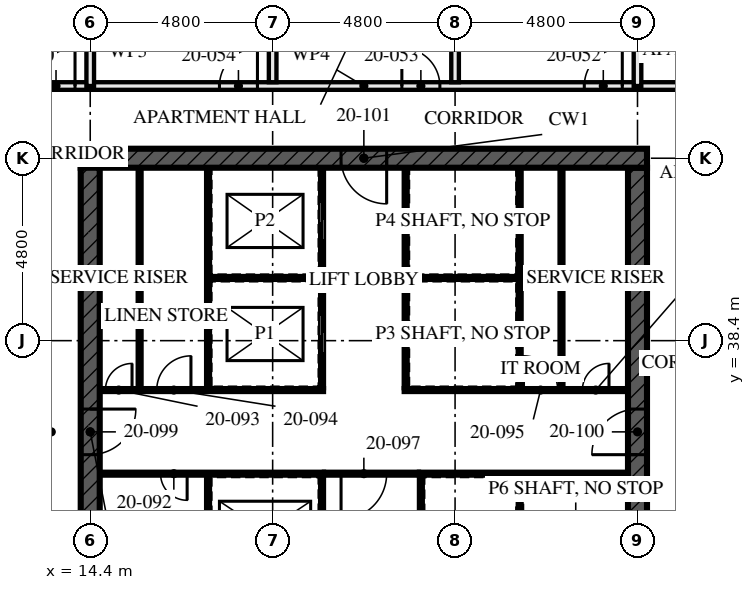
"""IFC4 building model, lengths in metres.
Left out: names, types, materials, properties, quantities, classifications, styles, units other than length and angle.
Written with IfcOpenShell. Run it as: python <this file> out.ifc"""

import sys

from ifc_helpers import new_model, si_unit, direction, frame, frame_2d, origin, place, context, subcontext, project, spatial, rectangle, extrude, element, fill, save


model = new_model("IFC4")
c1 = context("Model", 3, precision=1e-05, world=origin(), true_north=direction((0.0, 1.0)))
c2 = subcontext(c1, "Body", "Model", "MODEL_VIEW")
j1 = project(units=[si_unit("LENGTHUNIT", "METRE"), si_unit("PLANEANGLEUNIT", "RADIAN")], contexts=[c1])
p1 = place(None, origin())
s1 = spatial("IfcSite", under=j1, at=p1, CompositionType="ELEMENT")
p2 = place(p1, origin())
s2 = spatial("IfcBuilding", under=s1, at=p2, CompositionType="ELEMENT")
p3 = place(p2, frame((0.0, 0.0, 76.0)))
s3 = spatial("IfcBuildingStorey", under=s2, at=p3, CompositionType="ELEMENT", Elevation=76.0)
p4 = place(p3, frame((29.05, 43.2, -0.17), z_axis=(0.0, 0.0, 1.0), x_axis=(-1.0, 0.0, 0.0)))
e1 = element("IfcWall", 1, at=p4, inside=s3, PredefinedType="SHEAR", context=c2, shape_type="SweptSolid", body=[
    extrude(rectangle(XDim=14.9, YDim=0.5, at=frame_2d((7.45, 0.0))), origin(), (0.0, 0.0, 1.0), 3.42),
])
p5 = place(p4, frame((6.85, 0.0, 0.17)))
e2 = element("IfcOpeningElement", 2, at=p5, cuts=e1, PredefinedType="OPENING", context=c2, shape_type="SweptSolid", body=[
    extrude(rectangle(XDim=1.2, YDim=2.1, at=frame_2d((0.6, 1.05))), frame((0.0, 0.26, 0.0), z_axis=(0.0, -1.0, 0.0), x_axis=(1.0, 0.0, 0.0)), (0.0, 0.0, 1.0), 0.521),
])
p6 = place(p3, frame((14.4, 42.95, -0.17), z_axis=(0.0, 0.0, 1.0), x_axis=(0.0, -1.0, 0.0)))
e3 = element("IfcWall", 3, at=p6, inside=s3, PredefinedType="SHEAR", context=c2, shape_type="SweptSolid", body=[
    extrude(rectangle(XDim=13.9, YDim=0.5, at=frame_2d((6.95, 0.0))), origin(), (0.0, 0.0, 1.0), 3.42),
])
p7 = place(p6, frame((6.35, 0.0, 0.17)))
e4 = element("IfcOpeningElement", 4, at=p7, cuts=e3, PredefinedType="OPENING", context=c2, shape_type="SweptSolid", body=[
    extrude(rectangle(XDim=1.2, YDim=2.1, at=frame_2d((0.6, 1.05))), frame((0.0, 0.26, 0.0), z_axis=(0.0, -1.0, 0.0), x_axis=(1.0, 0.0, 0.0)), (0.0, 0.0, 1.0), 0.521),
])
p8 = place(p3, frame((28.8, 29.05, -0.17), z_axis=(0.0, 0.0, 1.0), x_axis=(0.0, 1.0, 0.0)))
e5 = element("IfcWall", 5, at=p8, inside=s3, PredefinedType="SHEAR", context=c2, shape_type="SweptSolid", body=[
    extrude(rectangle(XDim=13.9, YDim=0.5, at=frame_2d((6.95, 0.0))), origin(), (0.0, 0.0, 1.0), 3.42),
])
p9 = place(p8, frame((6.35, 0.0, 0.17)))
e6 = element("IfcOpeningElement", 6, at=p9, cuts=e5, PredefinedType="OPENING", context=c2, shape_type="SweptSolid", body=[
    extrude(rectangle(XDim=1.2, YDim=2.1, at=frame_2d((0.6, 1.05))), frame((0.0, 0.26, 0.0), z_axis=(0.0, -1.0, 0.0), x_axis=(1.0, 0.0, 0.0)), (0.0, 0.0, 1.0), 0.521),
])
p10 = place(p3, frame((14.4, 45.1, 0.0), z_axis=(0.0, 0.0, 1.0), x_axis=(-1.0, 0.0, 0.0)))
e7 = element("IfcWall", 7, at=p10, inside=s3, PredefinedType="PARTITIONING", context=c2, shape_type="SweptSolid", body=[
    extrude(rectangle(XDim=9.6, YDim=0.2, at=frame_2d((4.8, 0.0))), origin(), (0.0, 0.0, 1.0), 3.25),
])
p11 = place(p10, frame((0.4, 0.0, 0.0)))
e8 = element("IfcOpeningElement", 8, at=p11, cuts=e7, PredefinedType="OPENING", context=c2, shape_type="SweptSolid", body=[
    extrude(rectangle(XDim=1.0, YDim=2.1, at=frame_2d((0.5, 1.05))), frame((0.0, 0.111, 0.0), z_axis=(0.0, -1.0, 0.0), x_axis=(1.0, 0.0, 0.0)), (0.0, 0.0, 1.0), 0.221),
])
p12 = place(p10, frame((5.2, 0.0, 0.0)))
e9 = element("IfcOpeningElement", 9, at=p12, cuts=e7, PredefinedType="OPENING", context=c2, shape_type="SweptSolid", body=[
    extrude(rectangle(XDim=1.0, YDim=2.1, at=frame_2d((0.5, 1.05))), frame((0.0, 0.111, 0.0), z_axis=(0.0, -1.0, 0.0), x_axis=(1.0, 0.0, 0.0)), (0.0, 0.0, 1.0), 0.221),
])
for number, where, z_axis, x_axis in (
    (10, (24.0, 57.28, 0.0), (0.0, 0.0, 1.0), (0.0, -1.0, 0.0)),
    (11, (19.2, 57.28, 0.0), (0.0, 0.0, 1.0), (0.0, -1.0, 0.0)),
):
    element("IfcWall", number, at=place(p3, frame(where, z_axis=z_axis, x_axis=x_axis)), inside=s3, PredefinedType="PARTITIONING", context=c2, shape_type="SweptSolid", body=[
        extrude(rectangle(XDim=12.08, YDim=0.2, at=frame_2d((6.04, 0.0))), origin(), (0.0, 0.0, 1.0), 2.04),
    ])
p13 = place(p3, frame((28.8, 45.1, 0.0), z_axis=(0.0, 0.0, 1.0), x_axis=(-1.0, 0.0, 0.0)))
e12 = element("IfcWall", 12, at=p13, inside=s3, PredefinedType="PARTITIONING", context=c2, shape_type="SweptSolid", body=[
    extrude(rectangle(XDim=14.4, YDim=0.2, at=frame_2d((7.2, 0.0))), origin(), (0.0, 0.0, 1.0), 3.25),
])
p14 = place(p13, frame((0.4, 0.0, 0.0)))
e13 = element("IfcOpeningElement", 13, at=p14, cuts=e12, PredefinedType="OPENING", context=c2, shape_type="SweptSolid", body=[
    extrude(rectangle(XDim=1.0, YDim=2.1, at=frame_2d((0.5, 1.05))), frame((0.0, 0.111, 0.0), z_axis=(0.0, -1.0, 0.0), x_axis=(1.0, 0.0, 0.0)), (0.0, 0.0, 1.0), 0.221),
])
p15 = place(p13, frame((5.2, 0.0, 0.0)))
e14 = element("IfcOpeningElement", 14, at=p15, cuts=e12, PredefinedType="OPENING", context=c2, shape_type="SweptSolid", body=[
    extrude(rectangle(XDim=1.0, YDim=2.1, at=frame_2d((0.5, 1.05))), frame((0.0, 0.111, 0.0), z_axis=(0.0, -1.0, 0.0), x_axis=(1.0, 0.0, 0.0)), (0.0, 0.0, 1.0), 0.221),
])
p16 = place(p13, frame((10.0, 0.0, 0.0)))
e15 = element("IfcOpeningElement", 15, at=p16, cuts=e12, PredefinedType="OPENING", context=c2, shape_type="SweptSolid", body=[
    extrude(rectangle(XDim=1.0, YDim=2.1, at=frame_2d((0.5, 1.05))), frame((0.0, 0.111, 0.0), z_axis=(0.0, -1.0, 0.0), x_axis=(1.0, 0.0, 0.0)), (0.0, 0.0, 1.0), 0.221),
])
p17 = place(p3, frame((38.4, 45.1, 0.0), z_axis=(0.0, 0.0, 1.0), x_axis=(-1.0, 0.0, 0.0)))
e16 = element("IfcWall", 16, at=p17, inside=s3, PredefinedType="PARTITIONING", context=c2, shape_type="SweptSolid", body=[
    extrude(rectangle(XDim=9.6, YDim=0.2, at=frame_2d((4.8, 0.0))), origin(), (0.0, 0.0, 1.0), 3.25),
])
p18 = place(p17, frame((0.4, 0.0, 0.0)))
e17 = element("IfcOpeningElement", 17, at=p18, cuts=e16, PredefinedType="OPENING", context=c2, shape_type="SweptSolid", body=[
    extrude(rectangle(XDim=1.0, YDim=2.1, at=frame_2d((0.5, 1.05))), frame((0.0, 0.111, 0.0), z_axis=(0.0, -1.0, 0.0), x_axis=(1.0, 0.0, 0.0)), (0.0, 0.0, 1.0), 0.221),
])
p19 = place(p17, frame((5.2, 0.0, 0.0)))
e18 = element("IfcOpeningElement", 18, at=p19, cuts=e16, PredefinedType="OPENING", context=c2, shape_type="SweptSolid", body=[
    extrude(rectangle(XDim=1.0, YDim=2.1, at=frame_2d((0.5, 1.05))), frame((0.0, 0.111, 0.0), z_axis=(0.0, -1.0, 0.0), x_axis=(1.0, 0.0, 0.0)), (0.0, 0.0, 1.0), 0.221),
])
for number, where, z_axis, x_axis in (
    (19, (15.7, 37.15, 0.0), (0.0, 0.0, 1.0), (0.0, 1.0, 0.0)),
    (20, (26.8, 37.15, 0.0), (0.0, 0.0, 1.0), (0.0, 1.0, 0.0)),
):
    element("IfcWall", number, at=place(p3, frame(where, z_axis=z_axis, x_axis=x_axis)), inside=s3, PredefinedType="SOLIDWALL", context=c2, shape_type="SweptSolid", body=[
        extrude(rectangle(XDim=5.8, YDim=0.1, at=frame_2d((2.9, 0.0))), origin(), (0.0, 0.0, 1.0), 3.25),
    ])
p20 = place(p3, frame((20.5, 29.05, 0.0), z_axis=(0.0, 0.0, 1.0), x_axis=(0.0, 1.0, 0.0)))
e21 = element("IfcWall", 21, at=p20, inside=s3, PredefinedType="SOLIDWALL", context=c2, shape_type="SweptSolid", body=[
    extrude(rectangle(XDim=5.8, YDim=0.1, at=frame_2d((2.9, 0.0))), origin(), (0.0, 0.0, 1.0), 3.25),
])
p21 = place(p20, frame((0.8, 0.0, 0.0)))
e22 = element("IfcOpeningElement", 22, at=p21, cuts=e21, PredefinedType="OPENING", context=c2, shape_type="SweptSolid", body=[
    extrude(rectangle(XDim=1.1, YDim=2.3, at=frame_2d((0.55, 1.15))), frame((0.0, 0.061, 0.0), z_axis=(0.0, -1.0, 0.0), x_axis=(1.0, 0.0, 0.0)), (0.0, 0.0, 1.0), 0.121),
])
p22 = place(p20, frame((3.775, 0.0, 0.0)))
e23 = element("IfcOpeningElement", 23, at=p22, cuts=e21, PredefinedType="OPENING", context=c2, shape_type="SweptSolid", body=[
    extrude(rectangle(XDim=1.1, YDim=2.3, at=frame_2d((0.55, 1.15))), frame((0.0, 0.061, 0.0), z_axis=(0.0, -1.0, 0.0), x_axis=(1.0, 0.0, 0.0)), (0.0, 0.0, 1.0), 0.121),
])
p23 = place(p3, frame((20.5, 37.15, 0.0), z_axis=(0.0, 0.0, 1.0), x_axis=(0.0, 1.0, 0.0)))
e24 = element("IfcWall", 24, at=p23, inside=s3, PredefinedType="SOLIDWALL", context=c2, shape_type="SweptSolid", body=[
    extrude(rectangle(XDim=5.8, YDim=0.1, at=frame_2d((2.9, 0.0))), origin(), (0.0, 0.0, 1.0), 3.25),
])
p24 = place(p23, frame((0.925, 0.0, 0.0)))
e25 = element("IfcOpeningElement", 25, at=p24, cuts=e24, PredefinedType="OPENING", context=c2, shape_type="SweptSolid", body=[
    extrude(rectangle(XDim=1.0, YDim=2.1, at=frame_2d((0.5, 1.05))), frame((0.0, 0.061, 0.0), z_axis=(0.0, -1.0, 0.0), x_axis=(1.0, 0.0, 0.0)), (0.0, 0.0, 1.0), 0.121),
])
p25 = place(p23, frame((3.9, 0.0, 0.0)))
e26 = element("IfcOpeningElement", 26, at=p25, cuts=e24, PredefinedType="OPENING", context=c2, shape_type="SweptSolid", body=[
    extrude(rectangle(XDim=1.0, YDim=2.1, at=frame_2d((0.5, 1.05))), frame((0.0, 0.061, 0.0), z_axis=(0.0, -1.0, 0.0), x_axis=(1.0, 0.0, 0.0)), (0.0, 0.0, 1.0), 0.121),
])
p26 = place(p3, frame((22.7, 37.15, 0.0), z_axis=(0.0, 0.0, 1.0), x_axis=(0.0, 1.0, 0.0)))
e27 = element("IfcWall", 27, at=p26, inside=s3, PredefinedType="SOLIDWALL", context=c2, shape_type="SweptSolid", body=[
    extrude(rectangle(XDim=5.8, YDim=0.1, at=frame_2d((2.9, 0.0))), origin(), (0.0, 0.0, 1.0), 3.25),
])
p27 = place(p3, frame((23.1, 29.05, 0.0), z_axis=(0.0, 0.0, 1.0), x_axis=(0.0, 1.0, 0.0)))
e28 = element("IfcWall", 28, at=p27, inside=s3, PredefinedType="SOLIDWALL", context=c2, shape_type="SweptSolid", body=[
    extrude(rectangle(XDim=5.8, YDim=0.1, at=frame_2d((2.9, 0.0))), origin(), (0.0, 0.0, 1.0), 3.25),
])
p28 = place(p27, frame((1.0, 0.0, 0.0)))
e29 = element("IfcOpeningElement", 29, at=p28, cuts=e28, PredefinedType="OPENING", context=c2, shape_type="SweptSolid", body=[
    extrude(rectangle(XDim=0.7, YDim=2.1, at=frame_2d((0.35, 1.05))), frame((0.0, 0.061, 0.0), z_axis=(0.0, -1.0, 0.0), x_axis=(1.0, 0.0, 0.0)), (0.0, 0.0, 1.0), 0.121),
])
p29 = place(p3, frame((14.65, 34.9, 0.0), z_axis=(0.0, 0.0, 1.0), x_axis=(1.0, 0.0, 0.0)))
e30 = element("IfcWall", 30, at=p29, inside=s3, PredefinedType="SOLIDWALL", context=c2, shape_type="SweptSolid", body=[
    extrude(rectangle(XDim=5.9, YDim=0.1, at=frame_2d((2.95, 0.0))), origin(), (0.0, 0.0, 1.0), 3.25),
])
p30 = place(p29, frame((1.6, 0.0, 0.0)))
e31 = element("IfcOpeningElement", 31, at=p30, cuts=e30, PredefinedType="OPENING", context=c2, shape_type="SweptSolid", body=[
    extrude(rectangle(XDim=0.7, YDim=2.1, at=frame_2d((0.35, 1.05))), frame((0.0, 0.061, 0.0), z_axis=(0.0, -1.0, 0.0), x_axis=(1.0, 0.0, 0.0)), (0.0, 0.0, 1.0), 0.121),
])
p31 = place(p3, frame((23.05, 34.9, 0.0), z_axis=(0.0, 0.0, 1.0), x_axis=(1.0, 0.0, 0.0)))
e32 = element("IfcWall", 32, at=p31, inside=s3, PredefinedType="SOLIDWALL", context=c2, shape_type="SweptSolid", body=[
    extrude(rectangle(XDim=5.5, YDim=0.1, at=frame_2d((2.75, 0.0))), origin(), (0.0, 0.0, 1.0), 3.25),
])
p32 = place(p3, frame((14.65, 37.1, 0.0), z_axis=(0.0, 0.0, 1.0), x_axis=(1.0, 0.0, 0.0)))
e33 = element("IfcWall", 33, at=p32, inside=s3, PredefinedType="SOLIDWALL", context=c2, shape_type="SweptSolid", body=[
    extrude(rectangle(XDim=5.9, YDim=0.1, at=frame_2d((2.95, 0.0))), origin(), (0.0, 0.0, 1.0), 3.25),
])
p33 = place(p32, frame((0.15, 0.0, 0.0)))
e34 = element("IfcOpeningElement", 34, at=p33, cuts=e33, PredefinedType="OPENING", context=c2, shape_type="SweptSolid", body=[
    extrude(rectangle(XDim=0.7, YDim=2.1, at=frame_2d((0.35, 1.05))), frame((0.0, 0.061, 0.0), z_axis=(0.0, -1.0, 0.0), x_axis=(1.0, 0.0, 0.0)), (0.0, 0.0, 1.0), 0.121),
])
p34 = place(p32, frame((1.5, 0.0, 0.0)))
e35 = element("IfcOpeningElement", 35, at=p34, cuts=e33, PredefinedType="OPENING", context=c2, shape_type="SweptSolid", body=[
    extrude(rectangle(XDim=0.9, YDim=2.1, at=frame_2d((0.45, 1.05))), frame((0.0, 0.061, 0.0), z_axis=(0.0, -1.0, 0.0), x_axis=(1.0, 0.0, 0.0)), (0.0, 0.0, 1.0), 0.121),
])
p35 = place(p3, frame((22.65, 37.1, 0.0), z_axis=(0.0, 0.0, 1.0), x_axis=(1.0, 0.0, 0.0)))
e36 = element("IfcWall", 36, at=p35, inside=s3, PredefinedType="SOLIDWALL", context=c2, shape_type="SweptSolid", body=[
    extrude(rectangle(XDim=5.9, YDim=0.1, at=frame_2d((2.95, 0.0))), origin(), (0.0, 0.0, 1.0), 3.25),
])
p36 = place(p35, frame((3.15, 0.0, 0.0)))
e37 = element("IfcOpeningElement", 37, at=p36, cuts=e36, PredefinedType="OPENING", context=c2, shape_type="SweptSolid", body=[
    extrude(rectangle(XDim=0.9, YDim=2.1, at=frame_2d((0.45, 1.05))), frame((0.0, 0.061, 0.0), z_axis=(0.0, -1.0, 0.0), x_axis=(1.0, 0.0, 0.0)), (0.0, 0.0, 1.0), 0.121),
])
p37 = place(p35, frame((4.7, 0.0, 0.0)))
e38 = element("IfcOpeningElement", 38, at=p37, cuts=e36, PredefinedType="OPENING", context=c2, shape_type="SweptSolid", body=[
    extrude(rectangle(XDim=0.7, YDim=2.1, at=frame_2d((0.35, 1.05))), frame((0.0, 0.061, 0.0), z_axis=(0.0, -1.0, 0.0), x_axis=(1.0, 0.0, 0.0)), (0.0, 0.0, 1.0), 0.121),
])
p38 = place(p3, frame((20.55, 34.9, 0.0), z_axis=(0.0, 0.0, 1.0), x_axis=(1.0, 0.0, 0.0)))
e39 = element("IfcWall", 39, at=p38, inside=s3, PredefinedType="SOLIDWALL", context=c2, shape_type="SweptSolid", body=[
    extrude(rectangle(XDim=2.5, YDim=0.1, at=frame_2d((1.25, 0.0))), origin(), (0.0, 0.0, 1.0), 3.25),
])
p39 = place(p38, frame((0.45, 0.0, 0.0)))
e40 = element("IfcOpeningElement", 40, at=p39, cuts=e39, PredefinedType="OPENING", context=c2, shape_type="SweptSolid", body=[
    extrude(rectangle(XDim=1.2, YDim=2.1, at=frame_2d((0.6, 1.05))), frame((0.0, 0.061, 0.0), z_axis=(0.0, -1.0, 0.0), x_axis=(1.0, 0.0, 0.0)), (0.0, 0.0, 1.0), 0.121),
])
for number, where, z_axis, x_axis in (
    (41, (17.5, 29.05, 0.0), (0.0, 0.0, 1.0), (0.0, 1.0, 0.0)),
    (42, (17.5, 37.15, 0.0), (0.0, 0.0, 1.0), (0.0, 1.0, 0.0)),
):
    element("IfcWall", number, at=place(p3, frame(where, z_axis=z_axis, x_axis=x_axis)), inside=s3, PredefinedType="SOLIDWALL", context=c2, shape_type="SweptSolid", body=[
        extrude(rectangle(XDim=5.8, YDim=0.1, at=frame_2d((2.9, 0.0))), origin(), (0.0, 0.0, 1.0), 3.25),
    ])
for number, where, z_axis, x_axis in (
    (43, (17.55, 40.05, 0.0), (0.0, 0.0, 1.0), (1.0, 0.0, 0.0)),
    (44, (22.75, 40.05, 0.0), (0.0, 0.0, 1.0), (1.0, 0.0, 0.0)),
):
    element("IfcWall", number, at=place(p3, frame(where, z_axis=z_axis, x_axis=x_axis)), inside=s3, PredefinedType="SOLIDWALL", context=c2, shape_type="SweptSolid", body=[
        extrude(rectangle(XDim=2.9, YDim=0.1, at=frame_2d((1.45, 0.0))), origin(), (0.0, 0.0, 1.0), 3.25),
    ])
p40 = place(p3, frame((25.7, 37.15, 0.0), z_axis=(0.0, 0.0, 1.0), x_axis=(0.0, 1.0, 0.0)))
e45 = element("IfcWall", 45, at=p40, inside=s3, PredefinedType="SOLIDWALL", context=c2, shape_type="SweptSolid", body=[
    extrude(rectangle(XDim=5.8, YDim=0.1, at=frame_2d((2.9, 0.0))), origin(), (0.0, 0.0, 1.0), 3.25),
])
p41 = place(p3, frame((25.7, 31.95, 0.0), z_axis=(0.0, 0.0, 1.0), x_axis=(0.0, 1.0, 0.0)))
e46 = element("IfcWall", 46, at=p41, inside=s3, PredefinedType="SOLIDWALL", context=c2, shape_type="SweptSolid", body=[
    extrude(rectangle(XDim=2.9, YDim=0.1, at=frame_2d((1.45, 0.0))), origin(), (0.0, 0.0, 1.0), 3.25),
])
for number, where, z_axis, x_axis in (
    (47, (14.4, 45.1, 0.0), (0.0, 0.0, 1.0), (0.0, 1.0, 0.0)),
    (48, (28.8, 45.1, 0.0), (0.0, 0.0, 1.0), (0.0, 1.0, 0.0)),
):
    element("IfcWall", number, at=place(p3, frame(where, z_axis=z_axis, x_axis=x_axis)), inside=s3, PredefinedType="PARTITIONING", context=c2, shape_type="SweptSolid", body=[
        extrude(rectangle(XDim=2.555, YDim=0.2, at=frame_2d((1.277, 0.0))), origin(), (0.0, 0.0, 1.0), 2.04),
    ])
p42 = place(p11, frame((1.0, 0.0, 0.0), z_axis=(0.0, 0.0, 1.0), x_axis=(-1.0, 0.0, 0.0)))
e49 = element("IfcDoor", 49, at=p42, inside=s3, OperationType="SINGLE_SWING_LEFT", PredefinedType="DOOR", context=c2, shape_type="SweptSolid", body=[
    extrude(rectangle(XDim=1.0, YDim=2.1, at=frame_2d((0.5, 1.05))), frame((0.0, 0.027, 0.0), z_axis=(0.0, -1.0, 0.0), x_axis=(1.0, 0.0, 0.0)), (0.0, 0.0, 1.0), 0.054),
])
fill(e8, e49)
p43 = place(p14, frame((1.0, 0.0, 0.0), z_axis=(0.0, 0.0, 1.0), x_axis=(-1.0, 0.0, 0.0)))
e50 = element("IfcDoor", 50, at=p43, inside=s3, OperationType="SINGLE_SWING_LEFT", PredefinedType="DOOR", context=c2, shape_type="SweptSolid", body=[
    extrude(rectangle(XDim=1.0, YDim=2.1, at=frame_2d((0.5, 1.05))), frame((0.0, 0.027, 0.0), z_axis=(0.0, -1.0, 0.0), x_axis=(1.0, 0.0, 0.0)), (0.0, 0.0, 1.0), 0.054),
])
fill(e13, e50)
p44 = place(p15, frame((1.0, 0.0, 0.0), z_axis=(0.0, 0.0, 1.0), x_axis=(-1.0, 0.0, 0.0)))
e51 = element("IfcDoor", 51, at=p44, inside=s3, OperationType="SINGLE_SWING_RIGHT", PredefinedType="DOOR", context=c2, shape_type="SweptSolid", body=[
    extrude(rectangle(XDim=1.0, YDim=2.1, at=frame_2d((0.5, 1.05))), frame((0.0, 0.027, 0.0), z_axis=(0.0, -1.0, 0.0), x_axis=(1.0, 0.0, 0.0)), (0.0, 0.0, 1.0), 0.054),
])
fill(e14, e51)
p45 = place(p16, frame((1.0, 0.0, 0.0), z_axis=(0.0, 0.0, 1.0), x_axis=(-1.0, 0.0, 0.0)))
e52 = element("IfcDoor", 52, at=p45, inside=s3, OperationType="SINGLE_SWING_LEFT", PredefinedType="DOOR", context=c2, shape_type="SweptSolid", body=[
    extrude(rectangle(XDim=1.0, YDim=2.1, at=frame_2d((0.5, 1.05))), frame((0.0, 0.027, 0.0), z_axis=(0.0, -1.0, 0.0), x_axis=(1.0, 0.0, 0.0)), (0.0, 0.0, 1.0), 0.054),
])
fill(e15, e52)
p46 = place(p24, origin())
e53 = element("IfcDoor", 53, at=p46, inside=s3, OperationType="SLIDING_TO_LEFT", PredefinedType="DOOR", context=c2, shape_type="SweptSolid", body=[
    extrude(rectangle(XDim=1.0, YDim=2.1, at=frame_2d((0.5, 1.05))), frame((0.0, 0.05, 0.0), z_axis=(0.0, -1.0, 0.0), x_axis=(1.0, 0.0, 0.0)), (0.0, 0.0, 1.0), 0.1),
])
fill(e25, e53)
p47 = place(p25, origin())
e54 = element("IfcDoor", 54, at=p47, inside=s3, OperationType="SLIDING_TO_LEFT", PredefinedType="DOOR", context=c2, shape_type="SweptSolid", body=[
    extrude(rectangle(XDim=1.0, YDim=2.1, at=frame_2d((0.5, 1.05))), frame((0.0, 0.05, 0.0), z_axis=(0.0, -1.0, 0.0), x_axis=(1.0, 0.0, 0.0)), (0.0, 0.0, 1.0), 0.1),
])
fill(e26, e54)
p48 = place(p30, frame((0.7, 0.0, 0.0), z_axis=(0.0, 0.0, 1.0), x_axis=(-1.0, 0.0, 0.0)))
e55 = element("IfcDoor", 55, at=p48, inside=s3, OperationType="SINGLE_SWING_RIGHT", PredefinedType="DOOR", context=c2, shape_type="SweptSolid", body=[
    extrude(rectangle(XDim=0.7, YDim=2.1, at=frame_2d((0.35, 1.05))), frame((0.0, 0.027, 0.0), z_axis=(0.0, -1.0, 0.0), x_axis=(1.0, 0.0, 0.0)), (0.0, 0.0, 1.0), 0.054),
])
fill(e31, e55)
p49 = place(p33, origin())
e56 = element("IfcDoor", 56, at=p49, inside=s3, OperationType="SINGLE_SWING_LEFT", PredefinedType="DOOR", context=c2, shape_type="SweptSolid", body=[
    extrude(rectangle(XDim=0.7, YDim=2.1, at=frame_2d((0.35, 1.05))), frame((0.0, 0.027, 0.0), z_axis=(0.0, -1.0, 0.0), x_axis=(1.0, 0.0, 0.0)), (0.0, 0.0, 1.0), 0.054),
])
fill(e34, e56)
p50 = place(p34, origin())
e57 = element("IfcDoor", 57, at=p50, inside=s3, OperationType="SINGLE_SWING_LEFT", PredefinedType="DOOR", context=c2, shape_type="SweptSolid", body=[
    extrude(rectangle(XDim=0.9, YDim=2.1, at=frame_2d((0.45, 1.05))), frame((0.0, 0.027, 0.0), z_axis=(0.0, -1.0, 0.0), x_axis=(1.0, 0.0, 0.0)), (0.0, 0.0, 1.0), 0.054),
])
fill(e35, e57)
p51 = place(p36, origin())
e58 = element("IfcDoor", 58, at=p51, inside=s3, OperationType="SINGLE_SWING_RIGHT", PredefinedType="DOOR", context=c2, shape_type="SweptSolid", body=[
    extrude(rectangle(XDim=0.9, YDim=2.1, at=frame_2d((0.45, 1.05))), frame((0.0, 0.027, 0.0), z_axis=(0.0, -1.0, 0.0), x_axis=(1.0, 0.0, 0.0)), (0.0, 0.0, 1.0), 0.054),
])
fill(e37, e58)
p52 = place(p37, origin())
e59 = element("IfcDoor", 59, at=p52, inside=s3, OperationType="SINGLE_SWING_LEFT", PredefinedType="DOOR", context=c2, shape_type="SweptSolid", body=[
    extrude(rectangle(XDim=0.7, YDim=2.1, at=frame_2d((0.35, 1.05))), frame((0.0, 0.027, 0.0), z_axis=(0.0, -1.0, 0.0), x_axis=(1.0, 0.0, 0.0)), (0.0, 0.0, 1.0), 0.054),
])
fill(e38, e59)
p53 = place(p39, frame((1.2, 0.0, 0.0), z_axis=(0.0, 0.0, 1.0), x_axis=(-1.0, 0.0, 0.0)))
e60 = element("IfcDoor", 60, at=p53, inside=s3, OperationType="SINGLE_SWING_LEFT", PredefinedType="DOOR", context=c2, shape_type="SweptSolid", body=[
    extrude(rectangle(XDim=1.2, YDim=2.1, at=frame_2d((0.6, 1.05))), frame((0.0, 0.027, 0.0), z_axis=(0.0, -1.0, 0.0), x_axis=(1.0, 0.0, 0.0)), (0.0, 0.0, 1.0), 0.054),
])
fill(e40, e60)
p54 = place(p7, origin())
e61 = element("IfcDoor", 61, at=p54, inside=s3, OperationType="SINGLE_SWING_LEFT", PredefinedType="DOOR", context=c2, shape_type="SweptSolid", body=[
    extrude(rectangle(XDim=1.2, YDim=2.1, at=frame_2d((0.6, 1.05))), frame((0.0, 0.027, 0.0), z_axis=(0.0, -1.0, 0.0), x_axis=(1.0, 0.0, 0.0)), (0.0, 0.0, 1.0), 0.054),
])
fill(e4, e61)
p55 = place(p9, origin())
e62 = element("IfcDoor", 62, at=p55, inside=s3, OperationType="SINGLE_SWING_LEFT", PredefinedType="DOOR", context=c2, shape_type="SweptSolid", body=[
    extrude(rectangle(XDim=1.2, YDim=2.1, at=frame_2d((0.6, 1.05))), frame((0.0, 0.027, 0.0), z_axis=(0.0, -1.0, 0.0), x_axis=(1.0, 0.0, 0.0)), (0.0, 0.0, 1.0), 0.054),
])
fill(e6, e62)
p56 = place(p5, origin())
e63 = element("IfcDoor", 63, at=p56, inside=s3, OperationType="SINGLE_SWING_LEFT", PredefinedType="DOOR", context=c2, shape_type="SweptSolid", body=[
    extrude(rectangle(XDim=1.2, YDim=2.1, at=frame_2d((0.6, 1.05))), frame((0.0, 0.027, 0.0), z_axis=(0.0, -1.0, 0.0), x_axis=(1.0, 0.0, 0.0)), (0.0, 0.0, 1.0), 0.054),
])
fill(e2, e63)
save(model, sys.argv[1])
